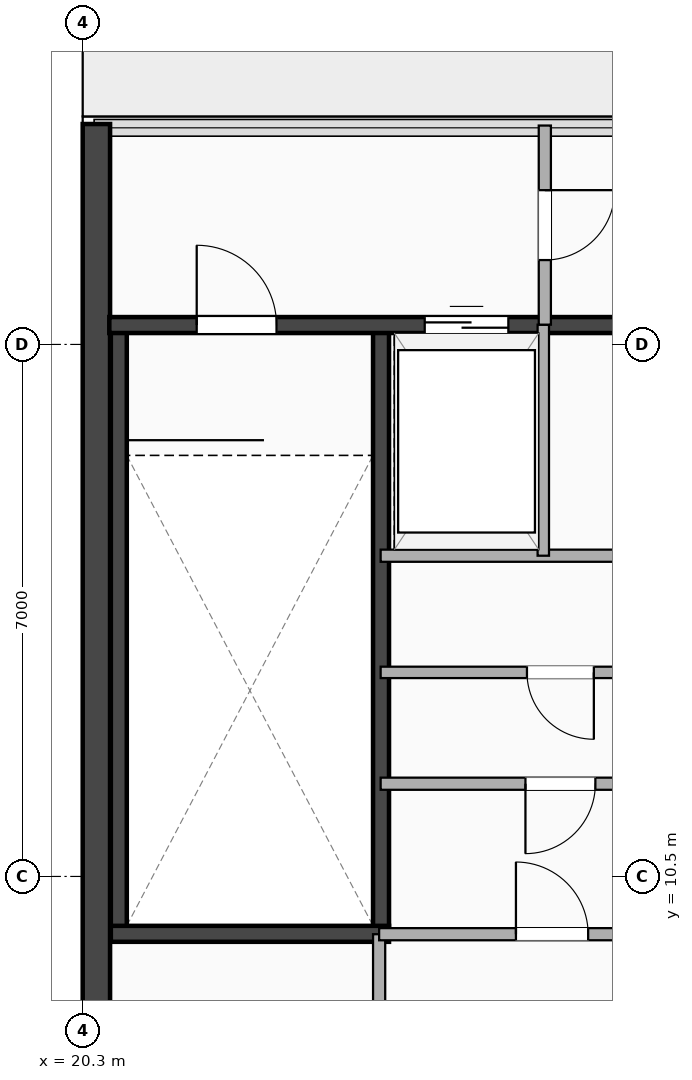
"""IFC4 building model, lengths in metres.
Left out: names, types, materials, properties, quantities, classifications, styles, units other than length and angle.
Written with IfcOpenShell. Run it as: python <this file> out.ifc"""

import sys

from ifc_helpers import new_model, si_unit, direction, frame, frame_2d, origin, place, context, subcontext, project, spatial, rectangle, extrude, element, fill, save


model = new_model("IFC4")
c1 = context("Model", 3, precision=1e-05, world=origin(), true_north=direction((0.0, 1.0)))
c2 = subcontext(c1, "Body", "Model", "MODEL_VIEW")
j1 = project(units=[si_unit("LENGTHUNIT", "METRE"), si_unit("PLANEANGLEUNIT", "RADIAN")], contexts=[c1])
p1 = place(None, origin())
s1 = spatial("IfcSite", under=j1, at=p1, CompositionType="ELEMENT")
p2 = place(p1, origin())
s2 = spatial("IfcBuilding", under=s1, at=p2, CompositionType="ELEMENT")
p3 = place(p2, frame((0.0, 0.0, 317.1)))
s3 = spatial("IfcBuildingStorey", under=s2, at=p3, CompositionType="ELEMENT", Elevation=317.1)
p4 = place(p3, frame((20.48, 3.5, 0.0), z_axis=(0.0, 0.0, 1.0), x_axis=(0.0, 1.0, 0.0)))
e1 = element("IfcWall", 1, at=p4, inside=s3, PredefinedType="SHEAR", context=c2, shape_type="SweptSolid", body=[
    extrude(rectangle(XDim=16.9, YDim=0.36, at=frame_2d((8.45, 0.0))), origin(), (0.0, 0.0, 1.0), 4.3),
])
for number, where, z_axis, x_axis in (
    (2, (20.775, 9.745, 0.0), (0.0, 0.0, 1.0), (0.0, 1.0, 0.0)),
    (3, (24.225, 9.745, 0.0), (0.0, 0.0, 1.0), (0.0, 1.0, 0.0)),
):
    element("IfcWall", number, at=place(p3, frame(where, z_axis=z_axis, x_axis=x_axis)), inside=s3, PredefinedType="SHEAR", context=c2, shape_type="SweptSolid", body=[
        extrude(rectangle(XDim=8.01, YDim=0.21, at=frame_2d((4.005, 0.0))), origin(), (0.0, 0.0, 1.0), 4.3),
    ])
p5 = place(p3, frame((20.67, 9.745, 0.0), z_axis=(0.0, 0.0, 1.0), x_axis=(1.0, 0.0, 0.0)))
e4 = element("IfcWall", 4, at=p5, inside=s3, PredefinedType="SHEAR", context=c2, shape_type="SweptSolid", body=[
    extrude(rectangle(XDim=3.66, YDim=0.21, at=frame_2d((1.83, 0.0))), origin(), (0.0, 0.0, 1.0), 4.3),
])
p6 = place(p3, frame((20.65, 17.755, 0.0), z_axis=(0.0, 0.0, 1.0), x_axis=(1.0, 0.0, 0.0)))
e5 = element("IfcWall", 5, at=p6, inside=s3, PredefinedType="SHEAR", context=c2, shape_type="SweptSolid", body=[
    extrude(rectangle(XDim=8.3, YDim=0.21, at=frame_2d((4.15, 0.0))), origin(), (0.0, 0.0, 1.0), 4.3),
])
p7 = place(p6, frame((2.2, 0.0, 0.0), z_axis=(0.0, 0.0, 1.0), x_axis=(-1.0, 0.0, 0.0)))
e6 = element("IfcOpeningElement", 6, at=p7, cuts=e5, PredefinedType="OPENING", context=c2, shape_type="SweptSolid", body=[
    extrude(rectangle(XDim=1.05, YDim=2.15, at=frame_2d((0.525, 1.075))), frame((0.0, 0.115, 0.0), z_axis=(0.0, -1.0, 0.0), x_axis=(1.0, 0.0, 0.0)), (0.0, 0.0, 1.0), 0.23),
])
p8 = place(p6, frame((4.15, 0.0, 0.0)))
e7 = element("IfcOpeningElement", 7, at=p8, cuts=e5, PredefinedType="OPENING", context=c2, shape_type="SweptSolid", body=[
    extrude(rectangle(XDim=1.1, YDim=2.18, at=frame_2d((0.55, 1.09))), frame((0.0, 0.115, 0.0), z_axis=(0.0, -1.0, 0.0), x_axis=(1.0, 0.0, 0.0)), (0.0, 0.0, 1.0), 0.23),
])
p9 = place(p3, frame((24.22, 14.72, 0.0), z_axis=(0.0, 0.0, 1.0), x_axis=(1.0, 0.0, 0.0)))
e8 = element("IfcWall", 8, at=p9, inside=s3, PredefinedType="PARTITIONING", context=c2, shape_type="SweptSolid", body=[
    extrude(rectangle(XDim=4.73, YDim=0.16, at=frame_2d((2.365, 0.0))), origin(), (0.0, 0.0, 1.0), 4.3),
])
p10 = place(p3, frame((26.36, 14.72, 0.0), z_axis=(0.0, 0.0, 1.0), x_axis=(0.0, 1.0, 0.0)))
e9 = element("IfcWall", 9, at=p10, inside=s3, PredefinedType="PARTITIONING", context=c2, shape_type="SweptSolid", body=[
    extrude(rectangle(XDim=3.04, YDim=0.15, at=frame_2d((1.52, 0.0))), origin(), (0.0, 0.0, 1.0), 4.3),
])
p11 = place(p3, frame((26.38, 17.76, 0.0), z_axis=(0.0, 0.0, 1.0), x_axis=(0.0, 1.0, 0.0)))
e10 = element("IfcWall", 10, at=p11, inside=s3, PredefinedType="PARTITIONING", context=c2, shape_type="SweptSolid", body=[
    extrude(rectangle(XDim=2.62, YDim=0.16, at=frame_2d((1.31, 0.0))), origin(), (0.0, 0.0, 1.0), 4.3),
])
p12 = place(p11, frame((0.85, 0.0, 0.0)))
e11 = element("IfcOpeningElement", 11, at=p12, cuts=e10, PredefinedType="OPENING", context=c2, shape_type="SweptSolid", body=[
    extrude(rectangle(XDim=0.92, YDim=2.08, at=frame_2d((0.46, 1.04))), frame((0.0, 0.09, 0.0), z_axis=(0.0, -1.0, 0.0), x_axis=(1.0, 0.0, 0.0)), (0.0, 0.0, 1.0), 0.18),
])
p13 = place(p3, frame((24.22, 11.72, 0.0), z_axis=(0.0, 0.0, 1.0), x_axis=(1.0, 0.0, 0.0)))
e12 = element("IfcWall", 12, at=p13, inside=s3, PredefinedType="PARTITIONING", context=c2, shape_type="SweptSolid", body=[
    extrude(rectangle(XDim=4.73, YDim=0.16, at=frame_2d((2.365, 0.0))), origin(), (0.0, 0.0, 1.0), 4.3),
])
p14 = place(p13, frame((1.905, 0.0, 0.0)))
e13 = element("IfcOpeningElement", 13, at=p14, cuts=e12, PredefinedType="OPENING", context=c2, shape_type="SweptSolid", body=[
    extrude(rectangle(XDim=0.92, YDim=2.08, at=frame_2d((0.46, 1.04))), frame((0.0, 0.09, 0.0), z_axis=(0.0, -1.0, 0.0), x_axis=(1.0, 0.0, 0.0)), (0.0, 0.0, 1.0), 0.18),
])
p15 = place(p3, frame((24.22, 13.185, 0.0), z_axis=(0.0, 0.0, 1.0), x_axis=(1.0, 0.0, 0.0)))
e14 = element("IfcWall", 14, at=p15, inside=s3, PredefinedType="PARTITIONING", context=c2, shape_type="SweptSolid", body=[
    extrude(rectangle(XDim=4.73, YDim=0.15, at=frame_2d((2.365, 0.0))), origin(), (0.0, 0.0, 1.0), 4.3),
])
p16 = place(p15, frame((1.925, 0.0, 0.0)))
e15 = element("IfcOpeningElement", 15, at=p16, cuts=e14, PredefinedType="OPENING", context=c2, shape_type="SweptSolid", body=[
    extrude(rectangle(XDim=0.88, YDim=2.08, at=frame_2d((0.44, 1.04))), frame((0.0, 0.085, 0.0), z_axis=(0.0, -1.0, 0.0), x_axis=(1.0, 0.0, 0.0)), (0.0, 0.0, 1.0), 0.17),
])
p17 = place(p3, frame((24.2, 3.95, 0.0), z_axis=(0.0, 0.0, 1.0), x_axis=(0.0, 1.0, 0.0)))
e16 = element("IfcWall", 16, at=p17, inside=s3, PredefinedType="PARTITIONING", context=c2, shape_type="SweptSolid", body=[
    extrude(rectangle(XDim=5.79, YDim=0.16, at=frame_2d((2.895, 0.0))), origin(), (0.0, 0.0, 1.0), 4.3),
])
p18 = place(p17, frame((2.2, 0.0, 0.0)))
e17 = element("IfcOpeningElement", 17, at=p18, cuts=e16, PredefinedType="OPENING", context=c2, shape_type="SweptSolid", body=[
    extrude(rectangle(XDim=0.92, YDim=2.08, at=frame_2d((0.46, 1.04))), frame((0.0, 0.09, 0.0), z_axis=(0.0, -1.0, 0.0), x_axis=(1.0, 0.0, 0.0)), (0.0, 0.0, 1.0), 0.18),
])
p19 = place(p3, frame((24.2, 9.74, 0.0), z_axis=(0.0, 0.0, 1.0), x_axis=(1.0, 0.0, 0.0)))
e18 = element("IfcWall", 18, at=p19, inside=s3, PredefinedType="PARTITIONING", context=c2, shape_type="SweptSolid", body=[
    extrude(rectangle(XDim=4.8, YDim=0.16, at=frame_2d((2.4, 0.0))), origin(), (0.0, 0.0, 1.0), 4.3),
])
p20 = place(p19, frame((2.75, 0.0, 0.0), z_axis=(0.0, 0.0, 1.0), x_axis=(-1.0, 0.0, 0.0)))
e19 = element("IfcOpeningElement", 19, at=p20, cuts=e18, PredefinedType="OPENING", context=c2, shape_type="SweptSolid", body=[
    extrude(rectangle(XDim=0.95, YDim=2.15, at=frame_2d((0.475, 1.075))), frame((0.0, 0.09, 0.0), z_axis=(0.0, -1.0, 0.0), x_axis=(1.0, 0.0, 0.0)), (0.0, 0.0, 1.0), 0.18),
])
p21 = place(p7, origin())
e20 = element("IfcDoor", 20, at=p21, inside=s3, OperationType="SINGLE_SWING_LEFT", PredefinedType="DOOR", context=c2, shape_type="SweptSolid", body=[
    extrude(rectangle(XDim=1.05, YDim=2.15, at=frame_2d((0.525, 1.075))), frame((0.0, 0.025, 0.0), z_axis=(0.0, -1.0, 0.0), x_axis=(1.0, 0.0, 0.0)), (0.0, 0.0, 1.0), 0.05),
])
fill(e6, e20)
p22 = place(p8, origin())
e21 = element("IfcDoor", 21, at=p22, inside=s3, OperationType="DOUBLE_DOOR_SLIDING", PredefinedType="DOOR", context=c2, shape_type="SweptSolid", body=[
    extrude(rectangle(XDim=1.1, YDim=2.18, at=frame_2d((0.55, 1.09))), frame((0.0, 0.025, 0.0), z_axis=(0.0, -1.0, 0.0), x_axis=(1.0, 0.0, 0.0)), (0.0, 0.0, 1.0), 0.05),
])
fill(e7, e21)
p23 = place(p12, origin())
e22 = element("IfcDoor", 22, at=p23, inside=s3, OperationType="SINGLE_SWING_RIGHT", PredefinedType="DOOR", context=c2, shape_type="SweptSolid", body=[
    extrude(rectangle(XDim=0.92, YDim=2.08, at=frame_2d((0.46, 1.04))), frame((0.0, 0.025, 0.0), z_axis=(0.0, -1.0, 0.0), x_axis=(1.0, 0.0, 0.0)), (0.0, 0.0, 1.0), 0.05),
])
fill(e11, e22)
p24 = place(p14, origin())
e23 = element("IfcDoor", 23, at=p24, inside=s3, OperationType="SINGLE_SWING_LEFT", PredefinedType="DOOR", context=c2, shape_type="SweptSolid", body=[
    extrude(rectangle(XDim=0.92, YDim=2.08, at=frame_2d((0.46, 1.04))), frame((0.0, 0.025, 0.0), z_axis=(0.0, -1.0, 0.0), x_axis=(1.0, 0.0, 0.0)), (0.0, 0.0, 1.0), 0.05),
])
fill(e13, e23)
p25 = place(p16, origin())
e24 = element("IfcDoor", 24, at=p25, inside=s3, OperationType="SINGLE_SWING_RIGHT", PredefinedType="DOOR", context=c2, shape_type="SweptSolid", body=[
    extrude(rectangle(XDim=0.88, YDim=2.08, at=frame_2d((0.44, 1.04))), frame((0.0, 0.025, 0.0), z_axis=(0.0, -1.0, 0.0), x_axis=(1.0, 0.0, 0.0)), (0.0, 0.0, 1.0), 0.05),
])
fill(e15, e24)
p26 = place(p20, origin())
e25 = element("IfcDoor", 25, at=p26, inside=s3, OperationType="SINGLE_SWING_LEFT", PredefinedType="DOOR", context=c2, shape_type="SweptSolid", body=[
    extrude(rectangle(XDim=0.95, YDim=2.15, at=frame_2d((0.475, 1.075))), frame((0.0, 0.025, 0.0), z_axis=(0.0, -1.0, 0.0), x_axis=(1.0, 0.0, 0.0)), (0.0, 0.0, 1.0), 0.05),
])
fill(e19, e25)
save(model, sys.argv[1])
